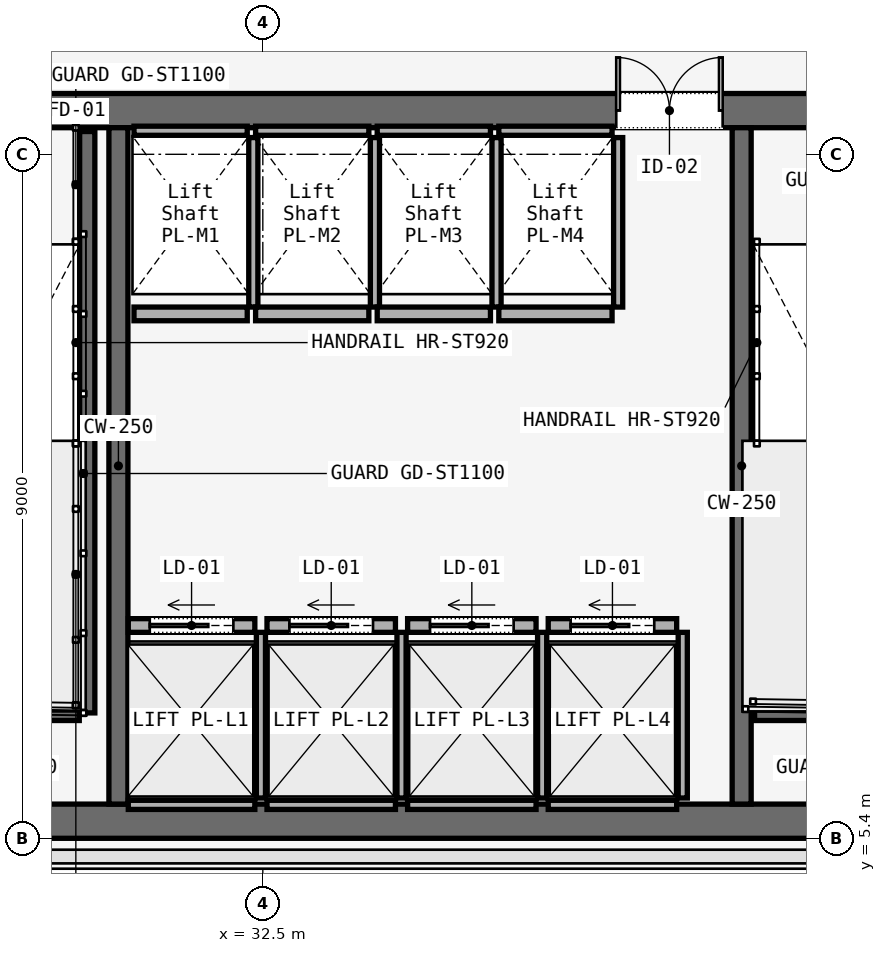
"""IFC4 building model, lengths in metres.
Left out: names, types, materials, properties, quantities, classifications, styles, units other than length and angle.
Written with IfcOpenShell. Run it as: python <this file> out.ifc"""

import sys

from ifc_helpers import new_model, si_unit, direction, frame, frame_2d, origin, place, context, subcontext, project, spatial, rectangle, extrude, element, fill, save


model = new_model("IFC4")
c1 = context("Model", 3, precision=1e-05, world=origin(), true_north=direction((0.0, 1.0)))
c2 = subcontext(c1, "Body", "Model", "MODEL_VIEW")
j1 = project(units=[si_unit("LENGTHUNIT", "METRE"), si_unit("PLANEANGLEUNIT", "RADIAN")], contexts=[c1])
p1 = place(None, origin())
s1 = spatial("IfcSite", under=j1, at=p1, CompositionType="ELEMENT")
p2 = place(p1, origin())
s2 = spatial("IfcBuilding", under=s1, at=p2, CompositionType="ELEMENT")
p3 = place(p2, frame((0.0, 0.0, 93.0)))
s3 = spatial("IfcBuildingStorey", under=s2, at=p3, CompositionType="ELEMENT", Elevation=93.0)
p4 = place(p3, frame((26.45, 14.975, 0.0), z_axis=(0.0, 0.0, 1.0), x_axis=(1.0, 0.0, 0.0)))
e1 = element("IfcWall", 1, at=p4, inside=s3, PredefinedType="SOLIDWALL", context=c2, shape_type="SweptSolid", body=[
    extrude(rectangle(XDim=31.1, YDim=0.45, at=frame_2d((15.55, 0.0))), origin(), (0.0, 0.0, 1.0), 3.58),
])
p5 = place(p4, frame((1.65, 0.0, 0.0)))
e2 = element("IfcOpeningElement", 2, at=p5, cuts=e1, PredefinedType="OPENING", context=c2, shape_type="SweptSolid", body=[
    extrude(rectangle(XDim=1.1, YDim=2.2, at=frame_2d((0.55, 1.1))), frame((0.0, 0.225, 0.0), z_axis=(0.0, -1.0, 0.0), x_axis=(1.0, 0.0, 0.0)), (0.0, 0.0, 1.0), 0.45),
])
p6 = place(p4, frame((13.65, 0.0, 0.0)))
e3 = element("IfcOpeningElement", 3, at=p6, cuts=e1, PredefinedType="OPENING", context=c2, shape_type="SweptSolid", body=[
    extrude(rectangle(XDim=1.1, YDim=2.2, at=frame_2d((0.55, 1.1))), frame((0.0, 0.225, 0.0), z_axis=(0.0, -1.0, 0.0), x_axis=(1.0, 0.0, 0.0)), (0.0, 0.0, 1.0), 0.45),
])
p7 = place(p4, frame((25.55, 0.0, 0.0)))
e4 = element("IfcOpeningElement", 4, at=p7, cuts=e1, PredefinedType="OPENING", context=c2, shape_type="SweptSolid", body=[
    extrude(rectangle(XDim=1.1, YDim=2.2, at=frame_2d((0.55, 1.1))), frame((0.0, 0.225, 0.0), z_axis=(0.0, -1.0, 0.0), x_axis=(1.0, 0.0, 0.0)), (0.0, 0.0, 1.0), 0.45),
])
p8 = place(p4, frame((10.7, 0.0, 0.0)))
e5 = element("IfcOpeningElement", 5, at=p8, cuts=e1, PredefinedType="OPENING", context=c2, shape_type="SweptSolid", body=[
    extrude(rectangle(XDim=1.4, YDim=2.2, at=frame_2d((0.7, 1.1))), frame((0.0, 0.225, 0.0), z_axis=(0.0, -1.0, 0.0), x_axis=(1.0, 0.0, 0.0)), (0.0, 0.0, 1.0), 0.45),
])
p9 = place(p4, frame((19.35, 0.0, 0.0)))
e6 = element("IfcOpeningElement", 6, at=p9, cuts=e1, PredefinedType="OPENING", context=c2, shape_type="SweptSolid", body=[
    extrude(rectangle(XDim=1.1, YDim=2.2, at=frame_2d((0.55, 1.1))), frame((0.0, 0.225, 0.0), z_axis=(0.0, -1.0, 0.0), x_axis=(1.0, 0.0, 0.0)), (0.0, 0.0, 1.0), 0.45),
])
p10 = place(p4, frame((21.4, 0.0, 0.0)))
e7 = element("IfcOpeningElement", 7, at=p10, cuts=e1, PredefinedType="OPENING", context=c2, shape_type="SweptSolid", body=[
    extrude(rectangle(XDim=0.9, YDim=2.1, at=frame_2d((0.45, 1.05))), frame((0.0, 0.225, 0.0), z_axis=(0.0, -1.0, 0.0), x_axis=(1.0, 0.0, 0.0)), (0.0, 0.0, 1.0), 0.45),
])
p11 = place(p4, frame((23.35, 0.0, 0.0)))
e8 = element("IfcOpeningElement", 8, at=p11, cuts=e1, PredefinedType="OPENING", context=c2, shape_type="SweptSolid", body=[
    extrude(rectangle(XDim=1.3, YDim=2.3, at=frame_2d((0.65, 1.15))), frame((0.0, 0.225, 0.0), z_axis=(0.0, -1.0, 0.0), x_axis=(1.0, 0.0, 0.0)), (0.0, 0.0, 1.0), 0.45),
])
p12 = place(p3, frame((26.45, 5.625, 0.0), z_axis=(0.0, 0.0, 1.0), x_axis=(1.0, 0.0, 0.0)))
e9 = element("IfcWall", 9, at=p12, inside=s3, PredefinedType="SOLIDWALL", context=c2, shape_type="SweptSolid", body=[
    extrude(rectangle(XDim=31.1, YDim=0.45, at=frame_2d((15.55, 0.0))), origin(), (0.0, 0.0, 1.0), 3.58),
])
for number, where, z_axis, x_axis in (
    (10, (30.6, 5.85, 0.0), (0.0, 0.0, 1.0), (0.0, 1.0, 0.0)),
    (11, (38.8, 5.85, 0.0), (0.0, 0.0, 1.0), (0.0, 1.0, 0.0)),
):
    element("IfcWall", number, at=place(p3, frame(where, z_axis=z_axis, x_axis=x_axis)), inside=s3, PredefinedType="SOLIDWALL", context=c2, shape_type="SweptSolid", body=[
        extrude(rectangle(XDim=8.9, YDim=0.25, at=frame_2d((4.45, 0.0))), origin(), (0.0, 0.0, 1.0), 3.58),
    ])
p13 = place(p3, frame((30.19, 14.7, 0.0), z_axis=(0.0, 0.0, 1.0), x_axis=(0.0, -1.0, 0.0)))
e12 = element("IfcWall", 12, at=p13, inside=s3, PredefinedType="SOLIDWALL", context=c2, shape_type="SweptSolid", body=[
    extrude(rectangle(XDim=7.65, YDim=0.2, at=frame_2d((3.825, 0.0))), origin(), (0.0, 0.0, 1.0), 3.8),
])
for number, where, z_axis, x_axis in (
    (13, (26.97, 7.05, 0.0), (0.0, 0.0, 1.0), (1.0, 0.0, 0.0)),
    (14, (38.97, 7.05, 0.0), (0.0, 0.0, 1.0), (1.0, 0.0, 0.0)),
):
    element("IfcWall", number, at=place(p3, frame(where, z_axis=z_axis, x_axis=x_axis)), inside=s3, PredefinedType="SOLIDWALL", context=c2, shape_type="SweptSolid", body=[
        extrude(rectangle(XDim=3.115, YDim=0.2, at=frame_2d((1.558, 0.0))), origin(), (0.0, 0.0, 1.0), 3.8),
    ])
p14 = place(p3, frame((30.73, 8.2, 0.0), z_axis=(0.0, 0.0, 1.0), x_axis=(1.0, 0.0, 0.0)))
e15 = element("IfcWall", 15, at=p14, inside=s3, PredefinedType="SOLIDWALL", context=c2, shape_type="SweptSolid", body=[
    extrude(rectangle(XDim=1.665, YDim=0.18, at=frame_2d((0.833, 0.0))), origin(), (0.0, 0.0, 1.0), 2.95),
])
p15 = place(p14, frame((0.282, 0.0, 0.0)))
e16 = element("IfcOpeningElement", 16, at=p15, cuts=e15, PredefinedType="OPENING", context=c2, shape_type="SweptSolid", body=[
    extrude(rectangle(XDim=1.1, YDim=2.2, at=frame_2d((0.55, 1.1))), frame((0.0, 0.09, 0.0), z_axis=(0.0, -1.0, 0.0), x_axis=(1.0, 0.0, 0.0)), (0.0, 0.0, 1.0), 0.18),
])
p16 = place(p3, frame((30.73, 5.84, 0.0), z_axis=(0.0, 0.0, 1.0), x_axis=(1.0, 0.0, 0.0)))
e17 = element("IfcWall", 17, at=p16, inside=s3, PredefinedType="SOLIDWALL", context=c2, shape_type="SweptSolid", body=[
    extrude(rectangle(XDim=1.665, YDim=0.12, at=frame_2d((0.833, 0.0))), origin(), (0.0, 0.0, 1.0), 2.95),
])
p17 = place(p3, frame((32.475, 5.93, 0.0), z_axis=(0.0, 0.0, 1.0), x_axis=(0.0, 1.0, 0.0)))
e18 = element("IfcWall", 18, at=p17, inside=s3, PredefinedType="SOLIDWALL", context=c2, shape_type="SweptSolid", body=[
    extrude(rectangle(XDim=2.18, YDim=0.12, at=frame_2d((1.09, 0.0))), origin(), (0.0, 0.0, 1.0), 2.95),
])
p18 = place(p3, frame((32.555, 8.2, 0.0), z_axis=(0.0, 0.0, 1.0), x_axis=(1.0, 0.0, 0.0)))
e19 = element("IfcWall", 19, at=p18, inside=s3, PredefinedType="SOLIDWALL", context=c2, shape_type="SweptSolid", body=[
    extrude(rectangle(XDim=1.69, YDim=0.18, at=frame_2d((0.845, 0.0))), origin(), (0.0, 0.0, 1.0), 2.95),
])
p19 = place(p18, frame((0.295, 0.0, 0.0)))
e20 = element("IfcOpeningElement", 20, at=p19, cuts=e19, PredefinedType="OPENING", context=c2, shape_type="SweptSolid", body=[
    extrude(rectangle(XDim=1.1, YDim=2.2, at=frame_2d((0.55, 1.1))), frame((0.0, 0.09, 0.0), z_axis=(0.0, -1.0, 0.0), x_axis=(1.0, 0.0, 0.0)), (0.0, 0.0, 1.0), 0.18),
])
p20 = place(p3, frame((32.555, 5.84, 0.0), z_axis=(0.0, 0.0, 1.0), x_axis=(1.0, 0.0, 0.0)))
e21 = element("IfcWall", 21, at=p20, inside=s3, PredefinedType="SOLIDWALL", context=c2, shape_type="SweptSolid", body=[
    extrude(rectangle(XDim=1.69, YDim=0.12, at=frame_2d((0.845, 0.0))), origin(), (0.0, 0.0, 1.0), 2.95),
])
p21 = place(p3, frame((34.325, 5.93, 0.0), z_axis=(0.0, 0.0, 1.0), x_axis=(0.0, 1.0, 0.0)))
e22 = element("IfcWall", 22, at=p21, inside=s3, PredefinedType="SOLIDWALL", context=c2, shape_type="SweptSolid", body=[
    extrude(rectangle(XDim=2.18, YDim=0.12, at=frame_2d((1.09, 0.0))), origin(), (0.0, 0.0, 1.0), 2.95),
])
p22 = place(p3, frame((34.405, 8.2, 0.0), z_axis=(0.0, 0.0, 1.0), x_axis=(1.0, 0.0, 0.0)))
e23 = element("IfcWall", 23, at=p22, inside=s3, PredefinedType="SOLIDWALL", context=c2, shape_type="SweptSolid", body=[
    extrude(rectangle(XDim=1.69, YDim=0.18, at=frame_2d((0.845, 0.0))), origin(), (0.0, 0.0, 1.0), 2.95),
])
p23 = place(p22, frame((0.295, 0.0, 0.0)))
e24 = element("IfcOpeningElement", 24, at=p23, cuts=e23, PredefinedType="OPENING", context=c2, shape_type="SweptSolid", body=[
    extrude(rectangle(XDim=1.1, YDim=2.2, at=frame_2d((0.55, 1.1))), frame((0.0, 0.09, 0.0), z_axis=(0.0, -1.0, 0.0), x_axis=(1.0, 0.0, 0.0)), (0.0, 0.0, 1.0), 0.18),
])
p24 = place(p3, frame((34.405, 5.84, 0.0), z_axis=(0.0, 0.0, 1.0), x_axis=(1.0, 0.0, 0.0)))
e25 = element("IfcWall", 25, at=p24, inside=s3, PredefinedType="SOLIDWALL", context=c2, shape_type="SweptSolid", body=[
    extrude(rectangle(XDim=1.69, YDim=0.12, at=frame_2d((0.845, 0.0))), origin(), (0.0, 0.0, 1.0), 2.95),
])
p25 = place(p3, frame((36.175, 5.93, 0.0), z_axis=(0.0, 0.0, 1.0), x_axis=(0.0, 1.0, 0.0)))
e26 = element("IfcWall", 26, at=p25, inside=s3, PredefinedType="SOLIDWALL", context=c2, shape_type="SweptSolid", body=[
    extrude(rectangle(XDim=2.18, YDim=0.12, at=frame_2d((1.09, 0.0))), origin(), (0.0, 0.0, 1.0), 2.95),
])
p26 = place(p3, frame((36.255, 8.2, 0.0), z_axis=(0.0, 0.0, 1.0), x_axis=(1.0, 0.0, 0.0)))
e27 = element("IfcWall", 27, at=p26, inside=s3, PredefinedType="SOLIDWALL", context=c2, shape_type="SweptSolid", body=[
    extrude(rectangle(XDim=1.69, YDim=0.18, at=frame_2d((0.845, 0.0))), origin(), (0.0, 0.0, 1.0), 2.95),
])
p27 = place(p26, frame((0.295, 0.0, 0.0)))
e28 = element("IfcOpeningElement", 28, at=p27, cuts=e27, PredefinedType="OPENING", context=c2, shape_type="SweptSolid", body=[
    extrude(rectangle(XDim=1.1, YDim=2.2, at=frame_2d((0.55, 1.1))), frame((0.0, 0.09, 0.0), z_axis=(0.0, -1.0, 0.0), x_axis=(1.0, 0.0, 0.0)), (0.0, 0.0, 1.0), 0.18),
])
p28 = place(p3, frame((36.255, 5.84, 0.0), z_axis=(0.0, 0.0, 1.0), x_axis=(1.0, 0.0, 0.0)))
e29 = element("IfcWall", 29, at=p28, inside=s3, PredefinedType="SOLIDWALL", context=c2, shape_type="SweptSolid", body=[
    extrude(rectangle(XDim=1.69, YDim=0.12, at=frame_2d((0.845, 0.0))), origin(), (0.0, 0.0, 1.0), 2.95),
])
p29 = place(p3, frame((38.025, 5.93, 0.0), z_axis=(0.0, 0.0, 1.0), x_axis=(0.0, 1.0, 0.0)))
e30 = element("IfcWall", 30, at=p29, inside=s3, PredefinedType="SOLIDWALL", context=c2, shape_type="SweptSolid", body=[
    extrude(rectangle(XDim=2.18, YDim=0.12, at=frame_2d((1.09, 0.0))), origin(), (0.0, 0.0, 1.0), 2.95),
])
p30 = place(p3, frame((30.805, 12.3, 0.0), z_axis=(0.0, 0.0, 1.0), x_axis=(1.0, 0.0, 0.0)))
e31 = element("IfcWall", 31, at=p30, inside=s3, PredefinedType="SOLIDWALL", context=c2, shape_type="SweptSolid", body=[
    extrude(rectangle(XDim=1.49, YDim=0.18, at=frame_2d((0.745, 0.0))), origin(), (0.0, 0.0, 1.0), 2.95),
])
p31 = place(p3, frame((30.805, 14.71, 0.0), z_axis=(0.0, 0.0, 1.0), x_axis=(1.0, 0.0, 0.0)))
e32 = element("IfcWall", 32, at=p31, inside=s3, PredefinedType="SOLIDWALL", context=c2, shape_type="SweptSolid", body=[
    extrude(rectangle(XDim=1.49, YDim=0.12, at=frame_2d((0.745, 0.0))), origin(), (0.0, 0.0, 1.0), 2.95),
])
p32 = place(p3, frame((32.375, 12.39, 0.0), z_axis=(0.0, 0.0, 1.0), x_axis=(0.0, 1.0, 0.0)))
e33 = element("IfcWall", 33, at=p32, inside=s3, PredefinedType="SOLIDWALL", context=c2, shape_type="SweptSolid", body=[
    extrude(rectangle(XDim=2.23, YDim=0.12, at=frame_2d((1.115, 0.0))), origin(), (0.0, 0.0, 1.0), 2.95),
])
p33 = place(p3, frame((32.405, 12.3, 0.0), z_axis=(0.0, 0.0, 1.0), x_axis=(1.0, 0.0, 0.0)))
e34 = element("IfcWall", 34, at=p33, inside=s3, PredefinedType="SOLIDWALL", context=c2, shape_type="SweptSolid", body=[
    extrude(rectangle(XDim=1.49, YDim=0.18, at=frame_2d((0.745, 0.0))), origin(), (0.0, 0.0, 1.0), 2.95),
])
p34 = place(p3, frame((32.405, 14.71, 0.0), z_axis=(0.0, 0.0, 1.0), x_axis=(1.0, 0.0, 0.0)))
e35 = element("IfcWall", 35, at=p34, inside=s3, PredefinedType="SOLIDWALL", context=c2, shape_type="SweptSolid", body=[
    extrude(rectangle(XDim=1.49, YDim=0.12, at=frame_2d((0.745, 0.0))), origin(), (0.0, 0.0, 1.0), 2.95),
])
p35 = place(p3, frame((33.975, 12.39, 0.0), z_axis=(0.0, 0.0, 1.0), x_axis=(0.0, 1.0, 0.0)))
e36 = element("IfcWall", 36, at=p35, inside=s3, PredefinedType="SOLIDWALL", context=c2, shape_type="SweptSolid", body=[
    extrude(rectangle(XDim=2.23, YDim=0.12, at=frame_2d((1.115, 0.0))), origin(), (0.0, 0.0, 1.0), 2.95),
])
p36 = place(p3, frame((34.005, 12.3, 0.0), z_axis=(0.0, 0.0, 1.0), x_axis=(1.0, 0.0, 0.0)))
e37 = element("IfcWall", 37, at=p36, inside=s3, PredefinedType="SOLIDWALL", context=c2, shape_type="SweptSolid", body=[
    extrude(rectangle(XDim=1.49, YDim=0.18, at=frame_2d((0.745, 0.0))), origin(), (0.0, 0.0, 1.0), 2.95),
])
p37 = place(p3, frame((34.005, 14.71, 0.0), z_axis=(0.0, 0.0, 1.0), x_axis=(1.0, 0.0, 0.0)))
e38 = element("IfcWall", 38, at=p37, inside=s3, PredefinedType="SOLIDWALL", context=c2, shape_type="SweptSolid", body=[
    extrude(rectangle(XDim=1.49, YDim=0.12, at=frame_2d((0.745, 0.0))), origin(), (0.0, 0.0, 1.0), 2.95),
])
p38 = place(p3, frame((35.575, 12.39, 0.0), z_axis=(0.0, 0.0, 1.0), x_axis=(0.0, 1.0, 0.0)))
e39 = element("IfcWall", 39, at=p38, inside=s3, PredefinedType="SOLIDWALL", context=c2, shape_type="SweptSolid", body=[
    extrude(rectangle(XDim=2.23, YDim=0.12, at=frame_2d((1.115, 0.0))), origin(), (0.0, 0.0, 1.0), 2.95),
])
p39 = place(p3, frame((35.605, 12.3, 0.0), z_axis=(0.0, 0.0, 1.0), x_axis=(1.0, 0.0, 0.0)))
e40 = element("IfcWall", 40, at=p39, inside=s3, PredefinedType="SOLIDWALL", context=c2, shape_type="SweptSolid", body=[
    extrude(rectangle(XDim=1.49, YDim=0.18, at=frame_2d((0.745, 0.0))), origin(), (0.0, 0.0, 1.0), 2.95),
])
p40 = place(p3, frame((35.605, 14.71, 0.0), z_axis=(0.0, 0.0, 1.0), x_axis=(1.0, 0.0, 0.0)))
e41 = element("IfcWall", 41, at=p40, inside=s3, PredefinedType="SOLIDWALL", context=c2, shape_type="SweptSolid", body=[
    extrude(rectangle(XDim=1.49, YDim=0.12, at=frame_2d((0.745, 0.0))), origin(), (0.0, 0.0, 1.0), 2.95),
])
p41 = place(p3, frame((37.175, 12.39, 0.0), z_axis=(0.0, 0.0, 1.0), x_axis=(0.0, 1.0, 0.0)))
e42 = element("IfcWall", 42, at=p41, inside=s3, PredefinedType="SOLIDWALL", context=c2, shape_type="SweptSolid", body=[
    extrude(rectangle(XDim=2.23, YDim=0.12, at=frame_2d((1.115, 0.0))), origin(), (0.0, 0.0, 1.0), 2.95),
])
p42 = place(p8, origin())
e43 = element("IfcDoor", 43, at=p42, inside=s3, OperationType="DOUBLE_DOOR_SINGLE_SWING", PredefinedType="DOOR", context=c2, shape_type="SweptSolid", body=[
    extrude(rectangle(XDim=1.4, YDim=2.2, at=frame_2d((0.7, 1.1))), frame((0.0, 0.025, 0.0), z_axis=(0.0, -1.0, 0.0), x_axis=(1.0, 0.0, 0.0)), (0.0, 0.0, 1.0), 0.05),
])
fill(e5, e43)
p43 = place(p15, origin())
e44 = element("IfcDoor", 44, at=p43, inside=s3, OperationType="SLIDING_TO_LEFT", PredefinedType="DOOR", context=c2, shape_type="SweptSolid", body=[
    extrude(rectangle(XDim=1.1, YDim=2.2, at=frame_2d((0.55, 1.1))), frame((0.0, 0.025, 0.0), z_axis=(0.0, -1.0, 0.0), x_axis=(1.0, 0.0, 0.0)), (0.0, 0.0, 1.0), 0.05),
])
fill(e16, e44)
p44 = place(p19, origin())
e45 = element("IfcDoor", 45, at=p44, inside=s3, OperationType="SLIDING_TO_LEFT", PredefinedType="DOOR", context=c2, shape_type="SweptSolid", body=[
    extrude(rectangle(XDim=1.1, YDim=2.2, at=frame_2d((0.55, 1.1))), frame((0.0, 0.025, 0.0), z_axis=(0.0, -1.0, 0.0), x_axis=(1.0, 0.0, 0.0)), (0.0, 0.0, 1.0), 0.05),
])
fill(e20, e45)
p45 = place(p23, origin())
e46 = element("IfcDoor", 46, at=p45, inside=s3, OperationType="SLIDING_TO_LEFT", PredefinedType="DOOR", context=c2, shape_type="SweptSolid", body=[
    extrude(rectangle(XDim=1.1, YDim=2.2, at=frame_2d((0.55, 1.1))), frame((0.0, 0.025, 0.0), z_axis=(0.0, -1.0, 0.0), x_axis=(1.0, 0.0, 0.0)), (0.0, 0.0, 1.0), 0.05),
])
fill(e24, e46)
p46 = place(p27, origin())
e47 = element("IfcDoor", 47, at=p46, inside=s3, OperationType="SLIDING_TO_LEFT", PredefinedType="DOOR", context=c2, shape_type="SweptSolid", body=[
    extrude(rectangle(XDim=1.1, YDim=2.2, at=frame_2d((0.55, 1.1))), frame((0.0, 0.025, 0.0), z_axis=(0.0, -1.0, 0.0), x_axis=(1.0, 0.0, 0.0)), (0.0, 0.0, 1.0), 0.05),
])
fill(e28, e47)
save(model, sys.argv[1])
